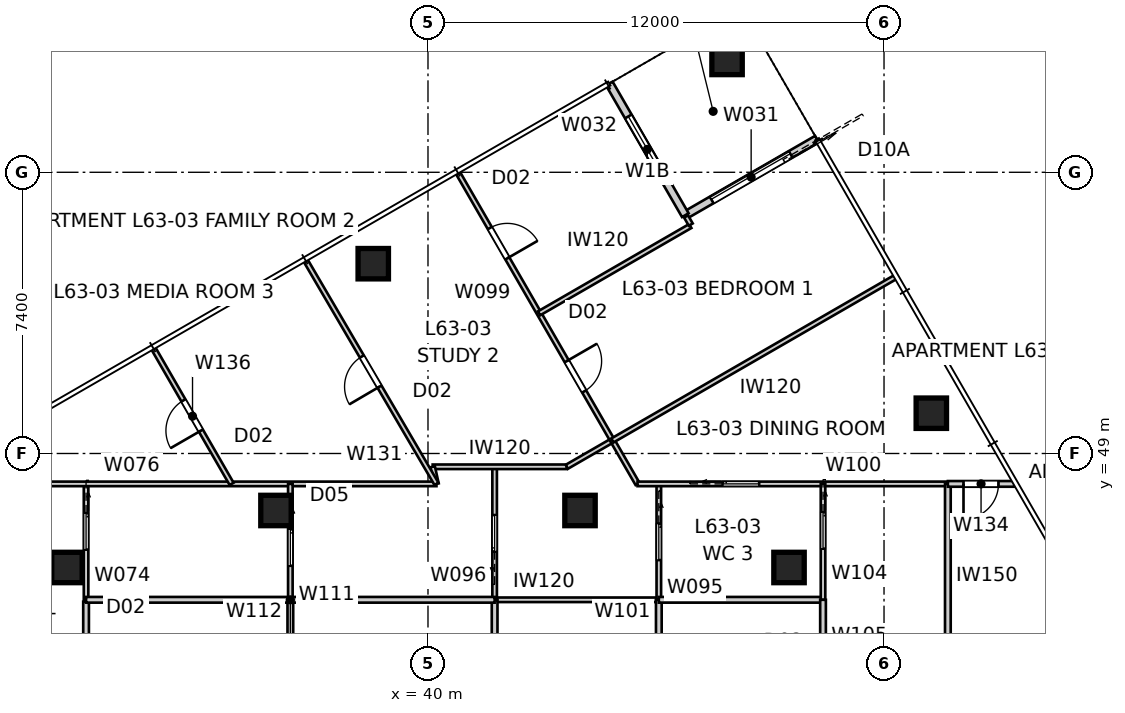
"""IFC4 building model, lengths in metres.
Left out: names, types, materials, properties, quantities, classifications, styles, units other than length and angle.
Written with IfcOpenShell. Run it as: python <this file> out.ifc"""

import sys

from ifc_helpers import new_model, si_unit, direction, frame, frame_2d, origin, origin_2d, place, context, subcontext, project, spatial, rectangle, extrude, element, fill, save


model = new_model("IFC4")
c1 = context("Model", 3, precision=1e-05, world=origin(), true_north=direction((0.0, 1.0)))
c2 = subcontext(c1, "Body", "Model", "MODEL_VIEW")
j1 = project(units=[si_unit("LENGTHUNIT", "METRE"), si_unit("PLANEANGLEUNIT", "RADIAN")], contexts=[c1])
p1 = place(None, origin())
s1 = spatial("IfcSite", under=j1, at=p1, CompositionType="ELEMENT")
p2 = place(p1, origin())
s2 = spatial("IfcBuilding", under=s1, at=p2, CompositionType="ELEMENT")
p3 = place(p2, frame((0.0, 0.0, 228.6)))
s3 = spatial("IfcBuildingStorey", under=s2, at=p3, CompositionType="ELEMENT", Elevation=228.6)
for number, where, z_axis, x_axis in (
    (1, (53.245, 50.06, 0.0), (0.0, 0.0, 1.0), (1.0, 0.0, 0.0)),
    (2, (47.87, 59.37, 0.0), (0.0, 0.0, 1.0), (1.0, 0.0, 0.0)),
    (3, (38.56, 53.995, 0.0), (0.0, 0.0, 1.0), (1.0, 0.0, 0.0)),
    (4, (49.5, 46.0, 0.0), (0.0, 0.0, 1.0), (1.0, 0.0, 0.0)),
    (5, (44.0, 47.5, 0.0), (0.0, 0.0, 1.0), (1.0, 0.0, 0.0)),
    (6, (36.0, 47.5, 0.0), (0.0, 0.0, 1.0), (1.0, 0.0, 0.0)),
    (7, (30.5, 46.0, 0.0), (0.0, 0.0, 1.0), (1.0, 0.0, 0.0)),
):
    element("IfcColumn", number, at=place(p3, frame(where, z_axis=z_axis, x_axis=x_axis)), inside=s3, PredefinedType="COLUMN", context=c2, shape_type="SweptSolid", body=[
        extrude(rectangle(XDim=0.8, YDim=0.8, at=origin_2d()), origin(), (0.0, 0.0, 1.0), 3.4),
    ])
p4 = place(p3, frame((50.236, 57.271, 0.0), z_axis=(0.0, 0.0, 1.0), x_axis=(-0.866026010844, -0.49999894854, 0.0)))
e8 = element("IfcWall", 8, at=p4, inside=s3, PredefinedType="SOLIDWALL", context=c2, shape_type="SweptSolid", body=[
    extrude(rectangle(XDim=4.0, YDim=0.2, at=frame_2d((2.0, 0.0))), origin(), (0.0, 0.0, 1.0), 3.25),
])
p5 = place(p4, frame((0.8, 0.0, 0.0)))
e9 = element("IfcOpeningElement", 9, at=p5, cuts=e8, PredefinedType="OPENING", context=c2, shape_type="SweptSolid", body=[
    extrude(rectangle(XDim=2.4, YDim=2.1, at=frame_2d((1.2, 1.05))), frame((0.0, 0.11, 0.0), z_axis=(0.0, -1.0, 0.0), x_axis=(1.0, 0.0, 0.0)), (0.0, 0.0, 1.0), 0.22),
])
p6 = place(p3, frame((46.771, 55.271, 0.0), z_axis=(0.0, 0.0, 1.0), x_axis=(-0.49999894854, 0.866026010844, 0.0)))
e10 = element("IfcWall", 10, at=p6, inside=s3, PredefinedType="SOLIDWALL", context=c2, shape_type="SweptSolid", body=[
    extrude(rectangle(XDim=4.0, YDim=0.2, at=frame_2d((2.0, 0.0))), origin(), (0.0, 0.0, 1.0), 3.25),
])
p7 = place(p6, frame((1.0, 0.0, 0.45)))
e11 = element("IfcOpeningElement", 11, at=p7, cuts=e10, PredefinedType="OPENING", context=c2, shape_type="SweptSolid", body=[
    extrude(rectangle(XDim=2.0, YDim=1.8, at=frame_2d((1.0, 0.9))), frame((0.0, 0.11, 0.0), z_axis=(0.0, -1.0, 0.0), x_axis=(1.0, 0.0, 0.0)), (0.0, 0.0, 1.0), 0.22),
])
p8 = place(p3, frame((31.003, 48.2, 0.0), z_axis=(0.0, 0.0, 1.0), x_axis=(0.0, -1.0, 0.0)))
e12 = element("IfcWall", 12, at=p8, inside=s3, PredefinedType="PARTITIONING", context=c2, shape_type="SweptSolid", body=[
    extrude(rectangle(XDim=3.1, YDim=0.12, at=frame_2d((1.55, 0.0))), origin(), (0.0, 0.0, 1.0), 3.25),
])
p9 = place(p8, frame((0.77, 0.0, 0.0)))
e13 = element("IfcOpeningElement", 13, at=p9, cuts=e12, PredefinedType="OPENING", context=c2, shape_type="SweptSolid", body=[
    extrude(rectangle(XDim=0.96, YDim=2.1, at=frame_2d((0.48, 1.05))), frame((0.0, 0.07, 0.0), z_axis=(0.0, -1.0, 0.0), x_axis=(1.0, 0.0, 0.0)), (0.0, 0.0, 1.0), 0.14),
])
p10 = place(p3, frame((31.003, 45.1, 0.0), z_axis=(0.0, 0.0, 1.0), x_axis=(0.0, -1.0, 0.0)))
e14 = element("IfcWall", 14, at=p10, inside=s3, PredefinedType="SOLIDWALL", context=c2, shape_type="SweptSolid", body=[
    extrude(rectangle(XDim=3.0, YDim=0.15, at=frame_2d((1.5, 0.0))), origin(), (0.0, 0.0, 1.0), 3.25),
])
p11 = place(p10, frame((0.99, 0.0, 0.0)))
e15 = element("IfcOpeningElement", 15, at=p11, cuts=e14, PredefinedType="OPENING", context=c2, shape_type="SweptSolid", body=[
    extrude(rectangle(XDim=0.92, YDim=2.34, at=frame_2d((0.46, 1.17))), frame((0.0, 0.085, 0.0), z_axis=(0.0, -1.0, 0.0), x_axis=(1.0, 0.0, 0.0)), (0.0, 0.0, 1.0), 0.17),
])
p12 = place(p3, frame((26.603, 48.2, 0.0), z_axis=(0.0, 0.0, 1.0), x_axis=(1.0, 0.0, 0.0)))
e16 = element("IfcWall", 16, at=p12, inside=s3, PredefinedType="PARTITIONING", context=c2, shape_type="SweptSolid", body=[
    extrude(rectangle(XDim=13.62, YDim=0.12, at=frame_2d((6.81, 0.0))), origin(), (0.0, 0.0, 1.0), 3.25),
])
p13 = place(p12, frame((1.25, 0.0, 0.0)))
e17 = element("IfcOpeningElement", 17, at=p13, cuts=e16, PredefinedType="OPENING", context=c2, shape_type="SweptSolid", body=[
    extrude(rectangle(XDim=0.92, YDim=2.1, at=frame_2d((0.46, 1.05))), frame((0.0, 0.07, 0.0), z_axis=(0.0, -1.0, 0.0), x_axis=(1.0, 0.0, 0.0)), (0.0, 0.0, 1.0), 0.14),
])
p14 = place(p3, frame((46.074, 45.15, 0.0), z_axis=(0.0, 0.0, 1.0), x_axis=(-1.0, 0.0, 0.0)))
e18 = element("IfcWall", 18, at=p14, inside=s3, PredefinedType="PARTITIONING", context=c2, shape_type="SweptSolid", body=[
    extrude(rectangle(XDim=4.321, YDim=0.12, at=frame_2d((2.16, 0.0))), origin(), (0.0, 0.0, 1.0), 3.25),
])
p15 = place(p3, frame((46.074, 48.2, 0.0), z_axis=(0.0, 0.0, 1.0), x_axis=(0.0, -1.0, 0.0)))
e19 = element("IfcWall", 19, at=p15, inside=s3, PredefinedType="PARTITIONING", context=c2, shape_type="SweptSolid", body=[
    extrude(rectangle(XDim=3.05, YDim=0.12, at=frame_2d((1.525, 0.0))), origin(), (0.0, 0.0, 1.0), 3.25),
])
p16 = place(p15, frame((1.045, 0.0, 0.0)))
e20 = element("IfcOpeningElement", 20, at=p16, cuts=e19, PredefinedType="OPENING", context=c2, shape_type="SweptSolid", body=[
    extrude(rectangle(XDim=0.96, YDim=2.1, at=frame_2d((0.48, 1.05))), frame((0.0, 0.07, 0.0), z_axis=(0.0, -1.0, 0.0), x_axis=(1.0, 0.0, 0.0)), (0.0, 0.0, 1.0), 0.14),
])
p17 = place(p3, frame((41.753, 45.15, 0.0), z_axis=(0.0, 0.0, 1.0), x_axis=(0.0, 1.0, 0.0)))
e21 = element("IfcWall", 21, at=p17, inside=s3, PredefinedType="PARTITIONING", context=c2, shape_type="SweptSolid", body=[
    extrude(rectangle(XDim=3.5, YDim=0.12, at=frame_2d((1.75, 0.0))), origin(), (0.0, 0.0, 1.0), 3.25),
])
p18 = place(p17, frame((1.27, 0.0, 0.0)))
e22 = element("IfcOpeningElement", 22, at=p18, cuts=e21, PredefinedType="OPENING", context=c2, shape_type="SweptSolid", body=[
    extrude(rectangle(XDim=0.96, YDim=2.1, at=frame_2d((0.48, 1.05))), frame((0.0, 0.07, 0.0), z_axis=(0.0, -1.0, 0.0), x_axis=(1.0, 0.0, 0.0)), (0.0, 0.0, 1.0), 0.14),
])
p19 = place(p3, frame((40.123, 48.65, 0.0), z_axis=(0.0, 0.0, 1.0), x_axis=(1.0, 0.0, 0.0)))
e23 = element("IfcWall", 23, at=p19, inside=s3, PredefinedType="PARTITIONING", context=c2, shape_type="SweptSolid", body=[
    extrude(rectangle(XDim=3.53, YDim=0.12, at=frame_2d((1.765, 0.0))), origin(), (0.0, 0.0, 1.0), 3.25),
])
p20 = place(p3, frame((43.653, 48.65, 0.0), z_axis=(0.0, 0.0, 1.0), x_axis=(0.865980246016, 0.500078207394, 0.0)))
e24 = element("IfcWall", 24, at=p20, inside=s3, PredefinedType="PARTITIONING", context=c2, shape_type="SweptSolid", body=[
    extrude(rectangle(XDim=1.346, YDim=0.12, at=frame_2d((0.673, 0.0))), origin(), (0.0, 0.0, 1.0), 3.25),
])
p21 = place(p3, frame((40.786, 56.388, 0.0), z_axis=(0.0, 0.0, 1.0), x_axis=(0.49999364752, -0.86602907136, 0.0)))
e25 = element("IfcWall", 25, at=p21, inside=s3, PredefinedType="PARTITIONING", context=c2, shape_type="SweptSolid", body=[
    extrude(rectangle(XDim=9.455, YDim=0.12, at=frame_2d((4.728, 0.0))), origin(), (0.0, 0.0, 1.0), 3.25),
])
p22 = place(p21, frame((1.681, 0.0, 0.0)))
e26 = element("IfcOpeningElement", 26, at=p22, cuts=e25, PredefinedType="OPENING", context=c2, shape_type="SweptSolid", body=[
    extrude(rectangle(XDim=0.92, YDim=2.34, at=frame_2d((0.46, 1.17))), frame((0.0, 0.07, 0.0), z_axis=(0.0, -1.0, 0.0), x_axis=(1.0, 0.0, 0.0)), (0.0, 0.0, 1.0), 0.14),
])
p23 = place(p21, frame((5.726, 0.0, 0.0)))
e27 = element("IfcOpeningElement", 27, at=p23, cuts=e25, PredefinedType="OPENING", context=c2, shape_type="SweptSolid", body=[
    extrude(rectangle(XDim=0.92, YDim=2.34, at=frame_2d((0.46, 1.17))), frame((0.0, 0.07, 0.0), z_axis=(0.0, -1.0, 0.0), x_axis=(1.0, 0.0, 0.0)), (0.0, 0.0, 1.0), 0.14),
])
p24 = place(p3, frame((45.514, 48.2, 0.0), z_axis=(0.0, 0.0, 1.0), x_axis=(1.0, 0.0, 0.0)))
e28 = element("IfcWall", 28, at=p24, inside=s3, PredefinedType="PARTITIONING", context=c2, shape_type="SweptSolid", body=[
    extrude(rectangle(XDim=8.166, YDim=0.12, at=frame_2d((4.083, 0.0))), origin(), (0.0, 0.0, 1.0), 3.25),
])
p25 = place(p24, frame((2.241, 0.0, 0.0)))
e29 = element("IfcOpeningElement", 29, at=p25, cuts=e28, PredefinedType="OPENING", context=c2, shape_type="SweptSolid", body=[
    extrude(rectangle(XDim=0.96, YDim=2.1, at=frame_2d((0.48, 1.05))), frame((0.0, 0.07, 0.0), z_axis=(0.0, -1.0, 0.0), x_axis=(1.0, 0.0, 0.0)), (0.0, 0.0, 1.0), 0.14),
])
p26 = place(p3, frame((46.074, 45.15, 0.0), z_axis=(0.0, 0.0, 1.0), x_axis=(0.0, -1.0, 0.0)))
e30 = element("IfcWall", 30, at=p26, inside=s3, PredefinedType="SOLIDWALL", context=c2, shape_type="SweptSolid", body=[
    extrude(rectangle(XDim=3.05, YDim=0.15, at=frame_2d((1.525, 0.0))), origin(), (0.0, 0.0, 1.0), 3.25),
])
p27 = place(p26, frame((1.065, 0.0, 0.0)))
e31 = element("IfcOpeningElement", 31, at=p27, cuts=e30, PredefinedType="OPENING", context=c2, shape_type="SweptSolid", body=[
    extrude(rectangle(XDim=0.92, YDim=2.34, at=frame_2d((0.46, 1.17))), frame((0.0, 0.085, 0.0), z_axis=(0.0, -1.0, 0.0), x_axis=(1.0, 0.0, 0.0)), (0.0, 0.0, 1.0), 0.17),
])
p28 = place(p3, frame((41.753, 42.1, 0.0), z_axis=(0.0, 0.0, 1.0), x_axis=(0.0, 1.0, 0.0)))
e32 = element("IfcWall", 32, at=p28, inside=s3, PredefinedType="SOLIDWALL", context=c2, shape_type="SweptSolid", body=[
    extrude(rectangle(XDim=3.05, YDim=0.15, at=frame_2d((1.525, 0.0))), origin(), (0.0, 0.0, 1.0), 3.25),
])
p29 = place(p28, frame((1.065, 0.0, 0.0)))
e33 = element("IfcOpeningElement", 33, at=p29, cuts=e32, PredefinedType="OPENING", context=c2, shape_type="SweptSolid", body=[
    extrude(rectangle(XDim=0.92, YDim=2.34, at=frame_2d((0.46, 1.17))), frame((0.0, 0.085, 0.0), z_axis=(0.0, -1.0, 0.0), x_axis=(1.0, 0.0, 0.0)), (0.0, 0.0, 1.0), 0.17),
])
p30 = place(p3, frame((50.395, 45.15, 0.0), z_axis=(0.0, 0.0, 1.0), x_axis=(-1.0, 0.0, 0.0)))
e34 = element("IfcWall", 34, at=p30, inside=s3, PredefinedType="SOLIDWALL", context=c2, shape_type="SweptSolid", body=[
    extrude(rectangle(XDim=4.321, YDim=0.15, at=frame_2d((2.16, 0.0))), origin(), (0.0, 0.0, 1.0), 3.25),
])
p31 = place(p3, frame((50.395, 48.2, 0.0), z_axis=(0.0, 0.0, 1.0), x_axis=(0.0, -1.0, 0.0)))
e35 = element("IfcWall", 35, at=p31, inside=s3, PredefinedType="PARTITIONING", context=c2, shape_type="SweptSolid", body=[
    extrude(rectangle(XDim=3.05, YDim=0.12, at=frame_2d((1.525, 0.0))), origin(), (0.0, 0.0, 1.0), 3.25),
])
p32 = place(p31, frame((0.745, 0.0, 0.0)))
e36 = element("IfcOpeningElement", 36, at=p32, cuts=e35, PredefinedType="OPENING", context=c2, shape_type="SweptSolid", body=[
    extrude(rectangle(XDim=0.96, YDim=2.1, at=frame_2d((0.48, 1.05))), frame((0.0, 0.07, 0.0), z_axis=(0.0, -1.0, 0.0), x_axis=(1.0, 0.0, 0.0)), (0.0, 0.0, 1.0), 0.14),
])
p33 = place(p3, frame((50.395, 45.15, 0.0), z_axis=(0.0, 0.0, 1.0), x_axis=(0.0, -1.0, 0.0)))
e37 = element("IfcWall", 37, at=p33, inside=s3, PredefinedType="SOLIDWALL", context=c2, shape_type="SweptSolid", body=[
    extrude(rectangle(XDim=3.05, YDim=0.15, at=frame_2d((1.525, 0.0))), origin(), (0.0, 0.0, 1.0), 3.25),
])
p34 = place(p33, frame((1.927, 0.0, 0.0)))
e38 = element("IfcOpeningElement", 38, at=p34, cuts=e37, PredefinedType="OPENING", context=c2, shape_type="SweptSolid", body=[
    extrude(rectangle(XDim=0.92, YDim=2.34, at=frame_2d((0.46, 1.17))), frame((0.0, 0.085, 0.0), z_axis=(0.0, -1.0, 0.0), x_axis=(1.0, 0.0, 0.0)), (0.0, 0.0, 1.0), 0.17),
])
p35 = place(p3, frame((53.68, 48.2, 0.0), z_axis=(0.0, 0.0, 1.0), x_axis=(0.0, -1.0, 0.0)))
e39 = element("IfcWall", 39, at=p35, inside=s3, PredefinedType="SOLIDWALL", context=c2, shape_type="SweptSolid", body=[
    extrude(rectangle(XDim=4.824, YDim=0.15, at=frame_2d((2.412, 0.0))), origin(), (0.0, 0.0, 1.0), 3.25),
])
p36 = place(p3, frame((41.753, 45.15, 0.0), z_axis=(0.0, 0.0, 1.0), x_axis=(-1.0, 0.0, 0.0)))
e40 = element("IfcWall", 40, at=p36, inside=s3, PredefinedType="SOLIDWALL", context=c2, shape_type="SweptSolid", body=[
    extrude(rectangle(XDim=10.751, YDim=0.15, at=frame_2d((5.375, 0.0))), origin(), (0.0, 0.0, 1.0), 3.25),
])
p37 = place(p3, frame((36.378, 48.2, 0.0), z_axis=(0.0, 0.0, 1.0), x_axis=(0.0, -1.0, 0.0)))
e41 = element("IfcWall", 41, at=p37, inside=s3, PredefinedType="PARTITIONING", context=c2, shape_type="SweptSolid", body=[
    extrude(rectangle(XDim=3.05, YDim=0.12, at=frame_2d((1.525, 0.0))), origin(), (0.0, 0.0, 1.0), 3.25),
])
p38 = place(p37, frame((1.195, 0.0, 0.0)))
e42 = element("IfcOpeningElement", 42, at=p38, cuts=e41, PredefinedType="OPENING", context=c2, shape_type="SweptSolid", body=[
    extrude(rectangle(XDim=0.96, YDim=2.1, at=frame_2d((0.48, 1.05))), frame((0.0, 0.07, 0.0), z_axis=(0.0, -1.0, 0.0), x_axis=(1.0, 0.0, 0.0)), (0.0, 0.0, 1.0), 0.14),
])
p39 = place(p3, frame((36.378, 45.15, 0.0), z_axis=(0.0, 0.0, 1.0), x_axis=(0.0, -1.0, 0.0)))
e43 = element("IfcWall", 43, at=p39, inside=s3, PredefinedType="SOLIDWALL", context=c2, shape_type="SweptSolid", body=[
    extrude(rectangle(XDim=3.05, YDim=0.15, at=frame_2d((1.525, 0.0))), origin(), (0.0, 0.0, 1.0), 3.25),
])
p40 = place(p39, frame((1.065, 0.0, 0.0)))
e44 = element("IfcOpeningElement", 44, at=p40, cuts=e43, PredefinedType="OPENING", context=c2, shape_type="SweptSolid", body=[
    extrude(rectangle(XDim=0.92, YDim=2.34, at=frame_2d((0.46, 1.17))), frame((0.0, 0.085, 0.0), z_axis=(0.0, -1.0, 0.0), x_axis=(1.0, 0.0, 0.0)), (0.0, 0.0, 1.0), 0.17),
])
p41 = place(p3, frame((40.223, 48.2, 0.0), z_axis=(0.0, 0.0, 1.0), x_axis=(-0.21665001594, 0.976249338332, 0.0)))
e45 = element("IfcWall", 45, at=p41, inside=s3, PredefinedType="PARTITIONING", context=c2, shape_type="SweptSolid", body=[
    extrude(rectangle(XDim=0.461, YDim=0.12, at=frame_2d((0.23, 0.0))), origin(), (0.0, 0.0, 1.0), 3.25),
])
p42 = place(p3, frame((52.288, 53.636, 0.0), z_axis=(0.0, 0.0, 1.0), x_axis=(-0.866020787358, -0.500007995801, 0.0)))
e46 = element("IfcWall", 46, at=p42, inside=s3, PredefinedType="PARTITIONING", context=c2, shape_type="SweptSolid", body=[
    extrude(rectangle(XDim=8.585, YDim=0.12, at=frame_2d((4.292, 0.0))), origin(), (0.0, 0.0, 1.0), 3.25),
])
p43 = place(p3, frame((42.922, 52.688, 0.0), z_axis=(0.0, 0.0, 1.0), x_axis=(0.866034300541, 0.499984590049, 0.0)))
e47 = element("IfcWall", 47, at=p43, inside=s3, PredefinedType="PARTITIONING", context=c2, shape_type="SweptSolid", body=[
    extrude(rectangle(XDim=4.595, YDim=0.12, at=frame_2d((2.298, 0.0))), origin(), (0.0, 0.0, 1.0), 3.25),
])
p44 = place(p3, frame((46.914, 55.024, 0.0), z_axis=(0.0, 0.0, 1.0), x_axis=(-0.499349249257, 0.86640078905, 0.0)))
e48 = element("IfcWall", 48, at=p44, inside=s3, PredefinedType="PARTITIONING", context=c2, shape_type="SweptSolid", body=[
    extrude(rectangle(XDim=0.245, YDim=0.12, at=frame_2d((0.123, 0.0))), origin(), (0.0, 0.0, 1.0), 3.25),
])
p45 = place(p3, frame((40.223, 48.2, 0.0), z_axis=(0.0, 0.0, 1.0), x_axis=(-0.505457259534, 0.862851643554, 0.0)))
e49 = element("IfcWall", 49, at=p45, inside=s3, PredefinedType="PARTITIONING", context=c2, shape_type="SweptSolid", body=[
    extrude(rectangle(XDim=6.81, YDim=0.12, at=frame_2d((3.405, 0.0))), origin(), (0.0, 0.0, 1.0), 3.25),
])
p46 = place(p45, frame((2.965, 0.0, 0.0)))
e50 = element("IfcOpeningElement", 50, at=p46, cuts=e49, PredefinedType="OPENING", context=c2, shape_type="SweptSolid", body=[
    extrude(rectangle(XDim=0.92, YDim=2.34, at=frame_2d((0.46, 1.17))), frame((0.0, 0.07, 0.0), z_axis=(0.0, -1.0, 0.0), x_axis=(1.0, 0.0, 0.0)), (0.0, 0.0, 1.0), 0.14),
])
p47 = place(p3, frame((55.427, 48.2, 0.0), z_axis=(0.0, 0.0, 1.0), x_axis=(-1.0, 0.0, 0.0)))
e51 = element("IfcWall", 51, at=p47, inside=s3, PredefinedType="SOLIDWALL", context=c2, shape_type="SweptSolid", body=[
    extrude(rectangle(XDim=1.747, YDim=0.15, at=frame_2d((0.874, 0.0))), origin(), (0.0, 0.0, 1.0), 3.25),
])
p48 = place(p47, frame((0.416, 0.0, 0.0)))
e52 = element("IfcOpeningElement", 52, at=p48, cuts=e51, PredefinedType="OPENING", context=c2, shape_type="SweptSolid", body=[
    extrude(rectangle(XDim=0.92, YDim=2.1, at=frame_2d((0.46, 1.05))), frame((0.0, 0.085, 0.0), z_axis=(0.0, -1.0, 0.0), x_axis=(1.0, 0.0, 0.0)), (0.0, 0.0, 1.0), 0.17),
])
p49 = place(p3, frame((34.833, 48.2, 0.0), z_axis=(0.0, 0.0, 1.0), x_axis=(-0.499999798456, 0.866025520146, 0.0)))
e53 = element("IfcWall", 53, at=p49, inside=s3, PredefinedType="PARTITIONING", context=c2, shape_type="SweptSolid", body=[
    extrude(rectangle(XDim=4.115, YDim=0.12, at=frame_2d((2.057, 0.0))), origin(), (0.0, 0.0, 1.0), 3.25),
])
p50 = place(p49, frame((1.617, 0.0, 0.0)))
e54 = element("IfcOpeningElement", 54, at=p50, cuts=e53, PredefinedType="OPENING", context=c2, shape_type="SweptSolid", body=[
    extrude(rectangle(XDim=0.92, YDim=2.34, at=frame_2d((0.46, 1.17))), frame((0.0, 0.07, 0.0), z_axis=(0.0, -1.0, 0.0), x_axis=(1.0, 0.0, 0.0)), (0.0, 0.0, 1.0), 0.14),
])
p51 = place(p5, origin())
e55 = element("IfcDoor", 55, at=p51, inside=s3, OperationType="SLIDING_TO_LEFT", PredefinedType="DOOR", context=c2, shape_type="SweptSolid", body=[
    extrude(rectangle(XDim=2.4, YDim=2.1, at=frame_2d((1.2, 1.05))), frame((0.0, 0.025, 0.0), z_axis=(0.0, -1.0, 0.0), x_axis=(1.0, 0.0, 0.0)), (0.0, 0.0, 1.0), 0.05),
])
fill(e9, e55)
p52 = place(p7, origin())
e56 = element("IfcWindow", 56, at=p52, inside=s3, PartitioningType="SINGLE_PANEL", PredefinedType="WINDOW", context=c2, shape_type="SweptSolid", body=[
    extrude(rectangle(XDim=2.0, YDim=1.8, at=frame_2d((1.0, 0.9))), frame((0.0, 0.03, 0.0), z_axis=(0.0, -1.0, 0.0), x_axis=(1.0, 0.0, 0.0)), (0.0, 0.0, 1.0), 0.06),
])
fill(e11, e56)
p53 = place(p9, origin())
e57 = element("IfcDoor", 57, at=p53, inside=s3, OperationType="SLIDING_TO_LEFT", PredefinedType="DOOR", context=c2, shape_type="SweptSolid", body=[
    extrude(rectangle(XDim=0.96, YDim=2.1, at=frame_2d((0.48, 1.05))), frame((0.0, 0.025, 0.0), z_axis=(0.0, -1.0, 0.0), x_axis=(1.0, 0.0, 0.0)), (0.0, 0.0, 1.0), 0.05),
])
fill(e13, e57)
p54 = place(p50, origin())
e58 = element("IfcDoor", 58, at=p54, inside=s3, OperationType="SINGLE_SWING_LEFT", PredefinedType="DOOR", context=c2, shape_type="SweptSolid", body=[
    extrude(rectangle(XDim=0.92, YDim=2.34, at=frame_2d((0.46, 1.17))), frame((0.0, 0.025, 0.0), z_axis=(0.0, -1.0, 0.0), x_axis=(1.0, 0.0, 0.0)), (0.0, 0.0, 1.0), 0.05),
])
fill(e54, e58)
p55 = place(p38, origin())
e59 = element("IfcDoor", 59, at=p55, inside=s3, OperationType="SLIDING_TO_LEFT", PredefinedType="DOOR", context=c2, shape_type="SweptSolid", body=[
    extrude(rectangle(XDim=0.96, YDim=2.1, at=frame_2d((0.48, 1.05))), frame((0.0, 0.025, 0.0), z_axis=(0.0, -1.0, 0.0), x_axis=(1.0, 0.0, 0.0)), (0.0, 0.0, 1.0), 0.05),
])
fill(e42, e59)
p56 = place(p46, origin())
e60 = element("IfcDoor", 60, at=p56, inside=s3, OperationType="SINGLE_SWING_LEFT", PredefinedType="DOOR", context=c2, shape_type="SweptSolid", body=[
    extrude(rectangle(XDim=0.92, YDim=2.34, at=frame_2d((0.46, 1.17))), frame((0.0, 0.025, 0.0), z_axis=(0.0, -1.0, 0.0), x_axis=(1.0, 0.0, 0.0)), (0.0, 0.0, 1.0), 0.05),
])
fill(e50, e60)
p57 = place(p18, origin())
e61 = element("IfcDoor", 61, at=p57, inside=s3, OperationType="SLIDING_TO_LEFT", PredefinedType="DOOR", context=c2, shape_type="SweptSolid", body=[
    extrude(rectangle(XDim=0.96, YDim=2.1, at=frame_2d((0.48, 1.05))), frame((0.0, 0.025, 0.0), z_axis=(0.0, -1.0, 0.0), x_axis=(1.0, 0.0, 0.0)), (0.0, 0.0, 1.0), 0.05),
])
fill(e22, e61)
p58 = place(p22, origin())
e62 = element("IfcDoor", 62, at=p58, inside=s3, OperationType="SINGLE_SWING_RIGHT", PredefinedType="DOOR", context=c2, shape_type="SweptSolid", body=[
    extrude(rectangle(XDim=0.92, YDim=2.34, at=frame_2d((0.46, 1.17))), frame((0.0, 0.025, 0.0), z_axis=(0.0, -1.0, 0.0), x_axis=(1.0, 0.0, 0.0)), (0.0, 0.0, 1.0), 0.05),
])
fill(e26, e62)
p59 = place(p23, origin())
e63 = element("IfcDoor", 63, at=p59, inside=s3, OperationType="SINGLE_SWING_LEFT", PredefinedType="DOOR", context=c2, shape_type="SweptSolid", body=[
    extrude(rectangle(XDim=0.92, YDim=2.34, at=frame_2d((0.46, 1.17))), frame((0.0, 0.025, 0.0), z_axis=(0.0, -1.0, 0.0), x_axis=(1.0, 0.0, 0.0)), (0.0, 0.0, 1.0), 0.05),
])
fill(e27, e63)
p60 = place(p16, origin())
e64 = element("IfcDoor", 64, at=p60, inside=s3, OperationType="SLIDING_TO_LEFT", PredefinedType="DOOR", context=c2, shape_type="SweptSolid", body=[
    extrude(rectangle(XDim=0.96, YDim=2.1, at=frame_2d((0.48, 1.05))), frame((0.0, 0.025, 0.0), z_axis=(0.0, -1.0, 0.0), x_axis=(1.0, 0.0, 0.0)), (0.0, 0.0, 1.0), 0.05),
])
fill(e20, e64)
p61 = place(p25, origin())
e65 = element("IfcDoor", 65, at=p61, inside=s3, OperationType="SLIDING_TO_LEFT", PredefinedType="DOOR", context=c2, shape_type="SweptSolid", body=[
    extrude(rectangle(XDim=0.96, YDim=2.1, at=frame_2d((0.48, 1.05))), frame((0.0, 0.025, 0.0), z_axis=(0.0, -1.0, 0.0), x_axis=(1.0, 0.0, 0.0)), (0.0, 0.0, 1.0), 0.05),
])
fill(e29, e65)
p62 = place(p32, origin())
e66 = element("IfcDoor", 66, at=p62, inside=s3, OperationType="SLIDING_TO_LEFT", PredefinedType="DOOR", context=c2, shape_type="SweptSolid", body=[
    extrude(rectangle(XDim=0.96, YDim=2.1, at=frame_2d((0.48, 1.05))), frame((0.0, 0.025, 0.0), z_axis=(0.0, -1.0, 0.0), x_axis=(1.0, 0.0, 0.0)), (0.0, 0.0, 1.0), 0.05),
])
fill(e36, e66)
p63 = place(p48, origin())
e67 = element("IfcDoor", 67, at=p63, inside=s3, OperationType="SINGLE_SWING_RIGHT", PredefinedType="DOOR", context=c2, shape_type="SweptSolid", body=[
    extrude(rectangle(XDim=0.92, YDim=2.1, at=frame_2d((0.46, 1.05))), frame((0.0, 0.025, 0.0), z_axis=(0.0, -1.0, 0.0), x_axis=(1.0, 0.0, 0.0)), (0.0, 0.0, 1.0), 0.05),
])
fill(e52, e67)
save(model, sys.argv[1])
